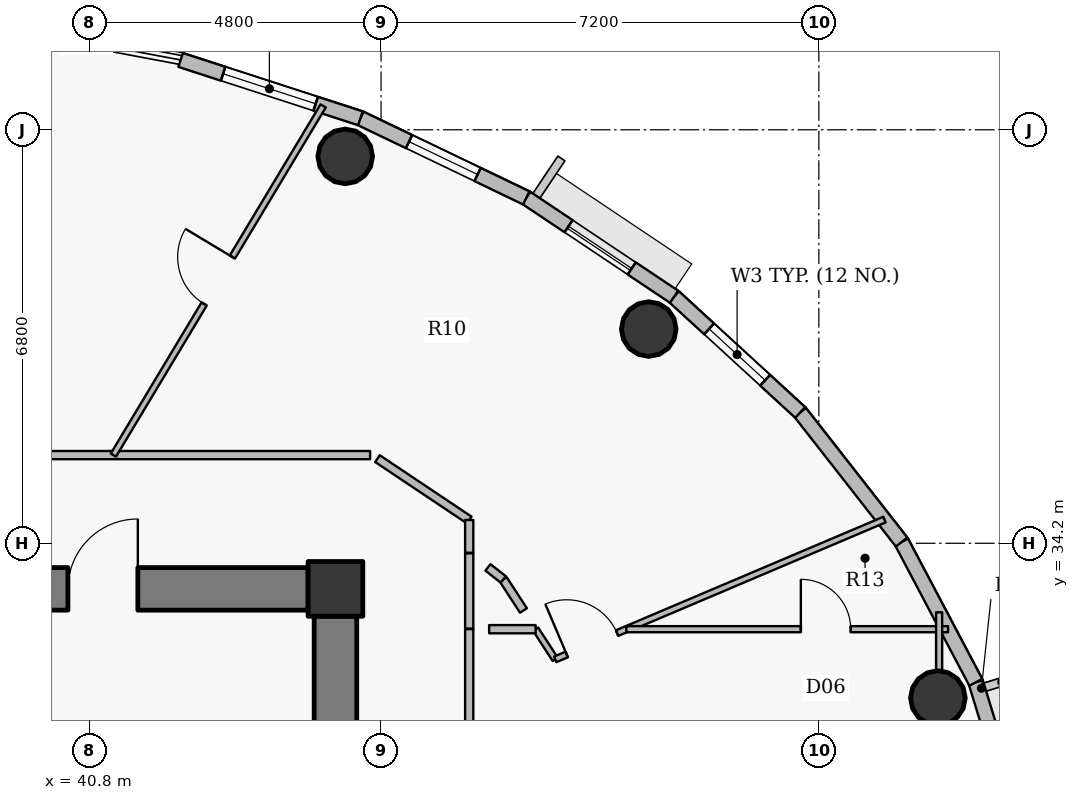
"""IFC4 building model, lengths in metres.
Left out: names, types, materials, properties, quantities, classifications, styles, units other than length and angle.
Written with IfcOpenShell. Run it as: python <this file> out.ifc"""

import sys

from ifc_helpers import new_model, si_unit, direction, frame, frame_2d, origin, origin_2d, place, context, subcontext, project, spatial, rectangle, hollow_circle, extrude, source, transform, mapped, element, fill, save


model = new_model("IFC4")
c1 = context("Model", 3, precision=1e-05, world=origin(), true_north=direction((0.0, 1.0)))
c2 = subcontext(c1, "Body", "Model", "MODEL_VIEW")
j1 = project(units=[si_unit("LENGTHUNIT", "METRE"), si_unit("PLANEANGLEUNIT", "RADIAN")], contexts=[c1])
p1 = place(None, origin())
s1 = spatial("IfcSite", under=j1, at=p1, CompositionType="ELEMENT")
p2 = place(p1, origin())
s2 = spatial("IfcBuilding", under=s1, at=p2, CompositionType="ELEMENT")
p3 = place(p2, frame((0.0, 0.0, 339.2)))
s3 = spatial("IfcBuildingStorey", under=s2, at=p3, CompositionType="ELEMENT", Elevation=339.2)
p4 = place(p3, frame((44.85, 33.45, 0.0), z_axis=(0.0, 0.0, 1.0), x_axis=(1.0, 0.0, 0.0)))
e1 = element("IfcColumn", 1, at=p4, inside=s3, PredefinedType="COLUMN", context=c2, shape_type="SweptSolid", body=[
    extrude(rectangle(XDim=0.9, YDim=0.9, at=origin_2d()), origin(), (0.0, 0.0, 1.0), 3.8),
])
p5 = place(p3, frame((27.6, 33.45, 0.0), z_axis=(0.0, 0.0, 1.0), x_axis=(1.0, 0.0, 0.0)))
e2 = element("IfcWall", 2, at=p5, inside=s3, PredefinedType="SHEAR", context=c2, shape_type="SweptSolid", body=[
    extrude(rectangle(XDim=16.8, YDim=0.7, at=frame_2d((8.4, 0.0))), origin(), (0.0, 0.0, 1.0), 3.1),
])
p6 = place(p5, frame((12.85, 0.0, 0.0)))
e3 = element("IfcOpeningElement", 3, at=p6, cuts=e2, PredefinedType="OPENING", context=c2, shape_type="SweptSolid", body=[
    extrude(rectangle(XDim=1.15, YDim=2.15, at=origin_2d()), frame((0.575, 0.36, 1.075), z_axis=(0.0, -1.0, 0.0), x_axis=(1.0, 0.0, 0.0)), (0.0, 0.0, 1.0), 0.72),
])
p7 = place(p3, frame((44.85, 33.0, 0.0), z_axis=(0.0, 0.0, 1.0), x_axis=(0.0, -1.0, 0.0)))
e4 = element("IfcWall", 4, at=p7, inside=s3, PredefinedType="SHEAR", context=c2, shape_type="SweptSolid", body=[
    extrude(rectangle(XDim=12.0, YDim=0.7, at=frame_2d((6.0, 0.0))), origin(), (0.0, 0.0, 1.0), 3.1),
])
for number, where, z_axis, x_axis in (
    (5, (54.758, 31.655, 0.0), (0.0, 0.0, 1.0), (1.0, 0.0, 0.0)),
    (6, (50.002, 37.723, 0.0), (0.0, 0.0, 1.0), (1.0, 0.0, 0.0)),
    (7, (45.01, 40.562, 0.0), (0.0, 0.0, 1.0), (1.0, 0.0, 0.0)),
):
    element("IfcColumn", number, at=place(p3, frame(where, z_axis=z_axis, x_axis=x_axis)), inside=s3, PredefinedType="COLUMN", context=c2, shape_type="SweptSolid", body=[
        extrude(hollow_circle(Radius=0.45, WallThickness=0.028, at=origin_2d()), origin(), (0.0, 0.0, 1.0), 3.8),
    ])
p8 = place(p3, frame((55.381, 31.913, 0.0), z_axis=(0.0, 0.0, 1.0), x_axis=(0.293105547213, -0.956080089842, 0.0)))
e8 = element("IfcWall", 8, at=p8, inside=s3, PredefinedType="SOLIDWALL", context=c2, shape_type="SweptSolid", body=[
    extrude(rectangle(XDim=2.538, YDim=0.24, at=frame_2d((1.269, 0.0))), origin(), (0.0, 0.0, 1.0), 2.035),
])
p9 = place(p3, frame((54.161, 34.221, 0.0), z_axis=(0.0, 0.0, 1.0), x_axis=(0.467487999989, -0.883999417345, 0.0)))
e9 = element("IfcWall", 9, at=p9, inside=s3, PredefinedType="SOLIDWALL", context=c2, shape_type="SweptSolid", body=[
    extrude(rectangle(XDim=2.61, YDim=0.24, at=frame_2d((1.305, 0.0))), origin(), (0.0, 0.0, 1.0), 2.035),
])
p10 = place(p3, frame((52.493, 36.352, 0.0), z_axis=(0.0, 0.0, 1.0), x_axis=(0.616286367698, -0.78752213492, 0.0)))
e10 = element("IfcWall", 10, at=p10, inside=s3, PredefinedType="SOLIDWALL", context=c2, shape_type="SweptSolid", body=[
    extrude(rectangle(XDim=2.706, YDim=0.24, at=frame_2d((1.353, 0.0))), origin(), (0.0, 0.0, 1.0), 3.55),
])
p11 = place(p3, frame((50.419, 38.254, 0.0), z_axis=(0.0, 0.0, 1.0), x_axis=(0.737020907932, -0.675869944051, 0.0)))
e11 = element("IfcWall", 11, at=p11, inside=s3, PredefinedType="SOLIDWALL", context=c2, shape_type="SweptSolid", body=[
    extrude(rectangle(XDim=2.815, YDim=0.24, at=frame_2d((1.407, 0.0))), origin(), (0.0, 0.0, 1.0), 3.55),
])
p12 = place(p11, frame((0.782, 0.0, 0.9)))
e12 = element("IfcOpeningElement", 12, at=p12, cuts=e11, PredefinedType="OPENING", context=c2, shape_type="SweptSolid", body=[
    extrude(rectangle(XDim=1.25, YDim=1.65, at=origin_2d()), frame((0.625, 0.13, 0.825), z_axis=(0.0, -1.0, 0.0), x_axis=(1.0, 0.0, 0.0)), (0.0, 0.0, 1.0), 0.26),
])
p13 = place(p3, frame((47.988, 39.88, 0.0), z_axis=(0.0, 0.0, 1.0), x_axis=(0.831201688654, -0.555970999944, 0.0)))
e13 = element("IfcWall", 13, at=p13, inside=s3, PredefinedType="SOLIDWALL", context=c2, shape_type="SweptSolid", body=[
    extrude(rectangle(XDim=2.925, YDim=0.24, at=frame_2d((1.462, 0.0))), origin(), (0.0, 0.0, 1.0), 3.55),
])
p14 = place(p13, frame((0.837, 0.0, 0.9)))
e14 = element("IfcOpeningElement", 14, at=p14, cuts=e13, PredefinedType="OPENING", context=c2, shape_type="SweptSolid", body=[
    extrude(rectangle(XDim=1.25, YDim=1.65, at=origin_2d()), frame((0.625, 0.13, 0.825), z_axis=(0.0, -1.0, 0.0), x_axis=(1.0, 0.0, 0.0)), (0.0, 0.0, 1.0), 0.26),
])
p15 = place(p3, frame((45.26, 41.189, 0.0), z_axis=(0.0, 0.0, 1.0), x_axis=(0.901557057889, -0.432660226241, 0.0)))
e15 = element("IfcWall", 15, at=p15, inside=s3, PredefinedType="SOLIDWALL", context=c2, shape_type="SweptSolid", body=[
    extrude(rectangle(XDim=3.025, YDim=0.24, at=frame_2d((1.513, 0.0))), origin(), (0.0, 0.0, 1.0), 3.55),
])
p16 = place(p15, frame((0.887, 0.0, 0.9)))
e16 = element("IfcOpeningElement", 16, at=p16, cuts=e15, PredefinedType="OPENING", context=c2, shape_type="SweptSolid", body=[
    extrude(rectangle(XDim=1.25, YDim=1.65, at=origin_2d()), frame((0.625, 0.13, 0.825), z_axis=(0.0, -1.0, 0.0), x_axis=(1.0, 0.0, 0.0)), (0.0, 0.0, 1.0), 0.26),
])
p17 = place(p3, frame((42.304, 42.148, 0.0), z_axis=(0.0, 0.0, 1.0), x_axis=(0.951212850731, -0.308535431682, 0.0)))
e17 = element("IfcWall", 17, at=p17, inside=s3, PredefinedType="SOLIDWALL", context=c2, shape_type="SweptSolid", body=[
    extrude(rectangle(XDim=3.108, YDim=0.24, at=frame_2d((1.554, 0.0))), origin(), (0.0, 0.0, 1.0), 3.55),
])
p18 = place(p17, frame((0.734, 0.0, 0.9)))
e18 = element("IfcOpeningElement", 18, at=p18, cuts=e17, PredefinedType="OPENING", context=c2, shape_type="SweptSolid", body=[
    extrude(rectangle(XDim=1.6, YDim=1.75, at=origin_2d()), frame((0.8, 0.13, 0.875), z_axis=(0.0, -1.0, 0.0), x_axis=(1.0, 0.0, 0.0)), (0.0, 0.0, 1.0), 0.26),
])
p19 = place(p3, frame((36.95, 35.65, 0.0), z_axis=(0.0, 0.0, 1.0), x_axis=(1.0, 0.0, 0.0)))
e19 = element("IfcWall", 19, at=p19, inside=s3, PredefinedType="PARTITIONING", context=c2, shape_type="SweptSolid", body=[
    extrude(rectangle(XDim=8.47, YDim=0.135, at=frame_2d((4.235, 0.0))), origin(), (0.0, 0.0, 1.0), 3.085),
])
p20 = place(p3, frame((41.198, 35.65, 0.0), z_axis=(0.0, 0.0, 1.0), x_axis=(0.515036887737, 0.857168014026, 0.0)))
e20 = element("IfcWall", 20, at=p20, inside=s3, PredefinedType="PARTITIONING", context=c2, shape_type="SweptSolid", body=[
    extrude(rectangle(XDim=6.7, YDim=0.1, at=frame_2d((3.35, 0.0))), origin(), (0.0, 0.0, 1.0), 3.035),
])
p21 = place(p20, frame((2.9, 0.0, 0.0)))
e21 = element("IfcOpeningElement", 21, at=p21, cuts=e20, PredefinedType="OPENING", context=c2, shape_type="SweptSolid", body=[
    extrude(rectangle(XDim=0.9, YDim=2.1, at=origin_2d()), frame((0.45, 0.06, 1.05), z_axis=(0.0, -1.0, 0.0), x_axis=(1.0, 0.0, 0.0)), (0.0, 0.0, 1.0), 0.12),
])
p22 = place(p3, frame((45.541, 35.592, 0.0), z_axis=(0.0, 0.0, 1.0), x_axis=(0.831180227396, -0.556003084151, 0.0)))
e22 = element("IfcWall", 22, at=p22, inside=s3, PredefinedType="PARTITIONING", context=c2, shape_type="SweptSolid", body=[
    extrude(rectangle(XDim=1.815, YDim=0.135, at=frame_2d((0.908, 0.0))), origin(), (0.0, 0.0, 1.0), 3.085),
])
p23 = place(p3, frame((47.05, 19.417, 0.0), z_axis=(0.0, 0.0, 1.0), x_axis=(0.0, 1.0, 0.0)))
e23 = element("IfcWall", 23, at=p23, inside=s3, PredefinedType="PARTITIONING", context=c2, shape_type="SweptSolid", body=[
    extrude(rectangle(XDim=13.37, YDim=0.135, at=frame_2d((6.685, 0.0))), origin(), (0.0, 0.0, 1.0), 2.25),
])
p24 = place(p23, frame((6.434, 0.0, 0.0)))
e24 = element("IfcOpeningElement", 24, at=p24, cuts=e23, PredefinedType="OPENING", context=c2, shape_type="SweptSolid", body=[
    extrude(rectangle(XDim=1.0, YDim=2.15, at=origin_2d()), frame((0.5, 0.078, 1.075), z_axis=(0.0, -1.0, 0.0), x_axis=(1.0, 0.0, 0.0)), (0.0, 0.0, 1.0), 0.155),
])
p25 = place(p3, frame((47.05, 34.044, 0.0), z_axis=(0.0, 0.0, 1.0), x_axis=(0.0, 1.0, 0.0)))
e25 = element("IfcWall", 25, at=p25, inside=s3, PredefinedType="PARTITIONING", context=c2, shape_type="SweptSolid", body=[
    extrude(rectangle(XDim=0.539, YDim=0.135, at=frame_2d((0.269, 0.0))), origin(), (0.0, 0.0, 1.0), 3.55),
])
p26 = place(p3, frame((48.142, 32.787, 0.0), z_axis=(0.0, 0.0, 1.0), x_axis=(0.545336289771, -0.838217353112, 0.0)))
e26 = element("IfcWall", 26, at=p26, inside=s3, PredefinedType="PARTITIONING", context=c2, shape_type="SweptSolid", body=[
    extrude(rectangle(XDim=0.592, YDim=0.1, at=frame_2d((0.296, 0.0))), origin(), (0.0, 0.0, 1.0), 3.55),
])
p27 = place(p3, frame((48.465, 32.291, 0.0), z_axis=(0.0, 0.0, 1.0), x_axis=(0.920507145492, 0.390725728739, 0.0)))
e27 = element("IfcWall", 27, at=p27, inside=s3, PredefinedType="PARTITIONING", context=c2, shape_type="SweptSolid", body=[
    extrude(rectangle(XDim=5.882, YDim=0.1, at=frame_2d((2.941, 0.0))), origin(), (0.0, 0.0, 1.0), 3.035),
])
p28 = place(p27, frame((0.205, 0.0, 0.0)))
e28 = element("IfcOpeningElement", 28, at=p28, cuts=e27, PredefinedType="OPENING", context=c2, shape_type="SweptSolid", body=[
    extrude(rectangle(XDim=0.9, YDim=2.1, at=origin_2d()), frame((0.45, 0.06, 1.05), z_axis=(0.0, -1.0, 0.0), x_axis=(1.0, 0.0, 0.0)), (0.0, 0.0, 1.0), 0.12),
])
p29 = place(p3, frame((49.634, 32.787, 0.0), z_axis=(0.0, 0.0, 1.0), x_axis=(1.0, 0.0, 0.0)))
e29 = element("IfcWall", 29, at=p29, inside=s3, PredefinedType="PARTITIONING", context=c2, shape_type="SweptSolid", body=[
    extrude(rectangle(XDim=5.291, YDim=0.1, at=frame_2d((2.645, 0.0))), origin(), (0.0, 0.0, 1.0), 3.035),
])
p30 = place(p29, frame((2.87, 0.0, 0.0)))
e30 = element("IfcOpeningElement", 30, at=p30, cuts=e29, PredefinedType="OPENING", context=c2, shape_type="SweptSolid", body=[
    extrude(rectangle(XDim=0.82, YDim=2.1, at=origin_2d()), frame((0.41, 0.06, 1.05), z_axis=(0.0, -1.0, 0.0), x_axis=(1.0, 0.0, 0.0)), (0.0, 0.0, 1.0), 0.12),
])
p31 = place(p3, frame((54.778, 22.665, 0.0), z_axis=(0.0, 0.0, 1.0), x_axis=(0.0, 1.0, 0.0)))
e31 = element("IfcWall", 31, at=p31, inside=s3, PredefinedType="PARTITIONING", context=c2, shape_type="SweptSolid", body=[
    extrude(rectangle(XDim=10.4, YDim=0.1, at=frame_2d((5.2, 0.0))), origin(), (0.0, 0.0, 1.0), 2.25),
])
p32 = place(p31, frame((6.139, 0.0, 0.0)))
e32 = element("IfcOpeningElement", 32, at=p32, cuts=e31, PredefinedType="OPENING", context=c2, shape_type="SweptSolid", body=[
    extrude(rectangle(XDim=0.9, YDim=2.1, at=origin_2d()), frame((0.45, 0.06, 1.05), z_axis=(0.0, -1.0, 0.0), x_axis=(1.0, 0.0, 0.0)), (0.0, 0.0, 1.0), 0.12),
])
p33 = place(p3, frame((47.05, 34.034, 0.0), z_axis=(0.0, 0.0, 1.0), x_axis=(0.0, -1.0, 0.0)))
e33 = element("IfcWall", 33, at=p33, inside=s3, PredefinedType="PARTITIONING", context=c2, shape_type="SweptSolid", body=[
    extrude(rectangle(XDim=1.237, YDim=0.135, at=frame_2d((0.618, 0.0))), origin(), (0.0, 0.0, 1.0), 3.55),
])
p34 = place(p3, frame((45.2, 33.8, 0.0), z_axis=(0.0, 0.0, 1.0), x_axis=(-1.0, 0.0, 0.0)))
e34 = element("IfcWall", 34, at=p34, inside=s3, PredefinedType="PARTITIONING", context=c2, shape_type="SweptSolid", body=[
    extrude(rectangle(XDim=0.79, YDim=0.135, at=frame_2d((0.395, 0.0))), origin(), (0.0, 0.0, 1.0), 3.085),
])
p35 = place(p3, frame((45.2, 33.01, 0.0), z_axis=(0.0, 0.0, 1.0), x_axis=(0.0, 1.0, 0.0)))
e35 = element("IfcWall", 35, at=p35, inside=s3, PredefinedType="PARTITIONING", context=c2, shape_type="SweptSolid", body=[
    extrude(rectangle(XDim=0.482, YDim=0.135, at=frame_2d((0.241, 0.0))), origin(), (0.0, 0.0, 1.0), 3.55),
])
p36 = place(p3, frame((47.377, 32.787, 0.0), z_axis=(0.0, 0.0, 1.0), x_axis=(1.0, 0.0, 0.0)))
e36 = element("IfcWall", 36, at=p36, inside=s3, PredefinedType="PARTITIONING", context=c2, shape_type="SweptSolid", body=[
    extrude(rectangle(XDim=0.765, YDim=0.135, at=frame_2d((0.382, 0.0))), origin(), (0.0, 0.0, 1.0), 3.55),
])
p37 = place(p3, frame((47.942, 33.094, 0.0), z_axis=(0.0, 0.0, 1.0), x_axis=(-0.545522826825, 0.838095964322, 0.0)))
e37 = element("IfcWall", 37, at=p37, inside=s3, PredefinedType="PARTITIONING", context=c2, shape_type="SweptSolid", body=[
    extrude(rectangle(XDim=0.61, YDim=0.135, at=frame_2d((0.305, 0.0))), origin(), (0.0, 0.0, 1.0), 3.55),
])
p38 = place(p3, frame((47.609, 33.606, 0.0), z_axis=(0.0, 0.0, 1.0), x_axis=(-0.787376183758, 0.616472826043, 0.0)))
e38 = element("IfcWall", 38, at=p38, inside=s3, PredefinedType="PARTITIONING", context=c2, shape_type="SweptSolid", body=[
    extrude(rectangle(XDim=0.32, YDim=0.135, at=frame_2d((0.16, 0.0))), origin(), (0.0, 0.0, 1.0), 3.55),
])
m1 = source(origin(), c2, "Body", "SweptSolid", [
    extrude(rectangle(XDim=1.25, YDim=1.65, at=origin_2d()), frame((0.625, 0.03, 0.825), z_axis=(0.0, -1.0, 0.0), x_axis=(1.0, 0.0, 0.0)), (0.0, 0.0, 1.0), 0.06),
])
p39 = place(p12, origin())
e39 = element("IfcWindow", 39, at=p39, inside=s3, PartitioningType="SINGLE_PANEL", PredefinedType="WINDOW", context=c2, shape_type="MappedRepresentation", body=[
    mapped(m1, transform((0.0, 0.0, 0.0), x_axis=(1.0, 0.0, 0.0), y_axis=(0.0, 1.0, 0.0), z_axis=(0.0, 0.0, 1.0), scale=1.0)),
])
fill(e12, e39)
p40 = place(p14, origin())
e40 = element("IfcWindow", 40, at=p40, inside=s3, PartitioningType="SINGLE_PANEL", PredefinedType="WINDOW", context=c2, shape_type="MappedRepresentation", body=[
    mapped(m1, transform((0.0, 0.0, 0.0), x_axis=(1.0, 0.0, 0.0), y_axis=(0.0, 1.0, 0.0), z_axis=(0.0, 0.0, 1.0), scale=1.0)),
])
fill(e14, e40)
p41 = place(p16, origin())
e41 = element("IfcWindow", 41, at=p41, inside=s3, PartitioningType="SINGLE_PANEL", PredefinedType="WINDOW", context=c2, shape_type="MappedRepresentation", body=[
    mapped(m1, transform((0.0, 0.0, 0.0), x_axis=(1.0, 0.0, 0.0), y_axis=(0.0, 1.0, 0.0), z_axis=(0.0, 0.0, 1.0), scale=1.0)),
])
fill(e16, e41)
m2 = source(origin(), c2, "Body", "SweptSolid", [
    extrude(rectangle(XDim=1.6, YDim=1.75, at=origin_2d()), frame((0.8, 0.03, 0.875), z_axis=(0.0, -1.0, 0.0), x_axis=(1.0, 0.0, 0.0)), (0.0, 0.0, 1.0), 0.06),
])
p42 = place(p18, origin())
e42 = element("IfcWindow", 42, at=p42, inside=s3, PartitioningType="DOUBLE_PANEL_VERTICAL", PredefinedType="WINDOW", context=c2, shape_type="MappedRepresentation", body=[
    mapped(m2, transform((0.0, 0.0, 0.0), x_axis=(1.0, 0.0, 0.0), y_axis=(0.0, 1.0, 0.0), z_axis=(0.0, 0.0, 1.0), scale=1.0)),
])
fill(e18, e42)
m3 = source(origin(), c2, "Body", "SweptSolid", [
    extrude(rectangle(XDim=1.15, YDim=2.15, at=origin_2d()), frame((0.575, 0.025, 1.075), z_axis=(0.0, -1.0, 0.0), x_axis=(1.0, 0.0, 0.0)), (0.0, 0.0, 1.0), 0.05),
])
p43 = place(p6, origin())
e43 = element("IfcDoor", 43, at=p43, inside=s3, OperationType="SINGLE_SWING_RIGHT", PredefinedType="DOOR", context=c2, shape_type="MappedRepresentation", body=[
    mapped(m3, transform((0.0, 0.0, 0.0), x_axis=(1.0, 0.0, 0.0), y_axis=(0.0, 1.0, 0.0), z_axis=(0.0, 0.0, 1.0), scale=1.0)),
])
fill(e3, e43)
m4 = source(origin(), c2, "Body", "SweptSolid", [
    extrude(rectangle(XDim=0.9, YDim=2.1, at=origin_2d()), frame((0.45, 0.025, 1.05), z_axis=(0.0, -1.0, 0.0), x_axis=(1.0, 0.0, 0.0)), (0.0, 0.0, 1.0), 0.05),
])
p44 = place(p28, origin())
e44 = element("IfcDoor", 44, at=p44, inside=s3, OperationType="SINGLE_SWING_LEFT", PredefinedType="DOOR", context=c2, shape_type="MappedRepresentation", body=[
    mapped(m4, transform((0.0, 0.0, 0.0), x_axis=(1.0, 0.0, 0.0), y_axis=(0.0, 1.0, 0.0), z_axis=(0.0, 0.0, 1.0), scale=1.0)),
])
fill(e28, e44)
p45 = place(p21, origin())
e45 = element("IfcDoor", 45, at=p45, inside=s3, OperationType="SINGLE_SWING_RIGHT", PredefinedType="DOOR", context=c2, shape_type="MappedRepresentation", body=[
    mapped(m4, transform((0.0, 0.0, 0.0), x_axis=(1.0, 0.0, 0.0), y_axis=(0.0, 1.0, 0.0), z_axis=(0.0, 0.0, 1.0), scale=1.0)),
])
fill(e21, e45)
m5 = source(origin(), c2, "Body", "SweptSolid", [
    extrude(rectangle(XDim=0.82, YDim=2.1, at=origin_2d()), frame((0.41, 0.025, 1.05), z_axis=(0.0, -1.0, 0.0), x_axis=(1.0, 0.0, 0.0)), (0.0, 0.0, 1.0), 0.05),
])
p46 = place(p30, origin())
e46 = element("IfcDoor", 46, at=p46, inside=s3, OperationType="SINGLE_SWING_LEFT", PredefinedType="DOOR", context=c2, shape_type="MappedRepresentation", body=[
    mapped(m5, transform((0.0, 0.0, 0.0), x_axis=(1.0, 0.0, 0.0), y_axis=(0.0, 1.0, 0.0), z_axis=(0.0, 0.0, 1.0), scale=1.0)),
])
fill(e30, e46)
save(model, sys.argv[1])
